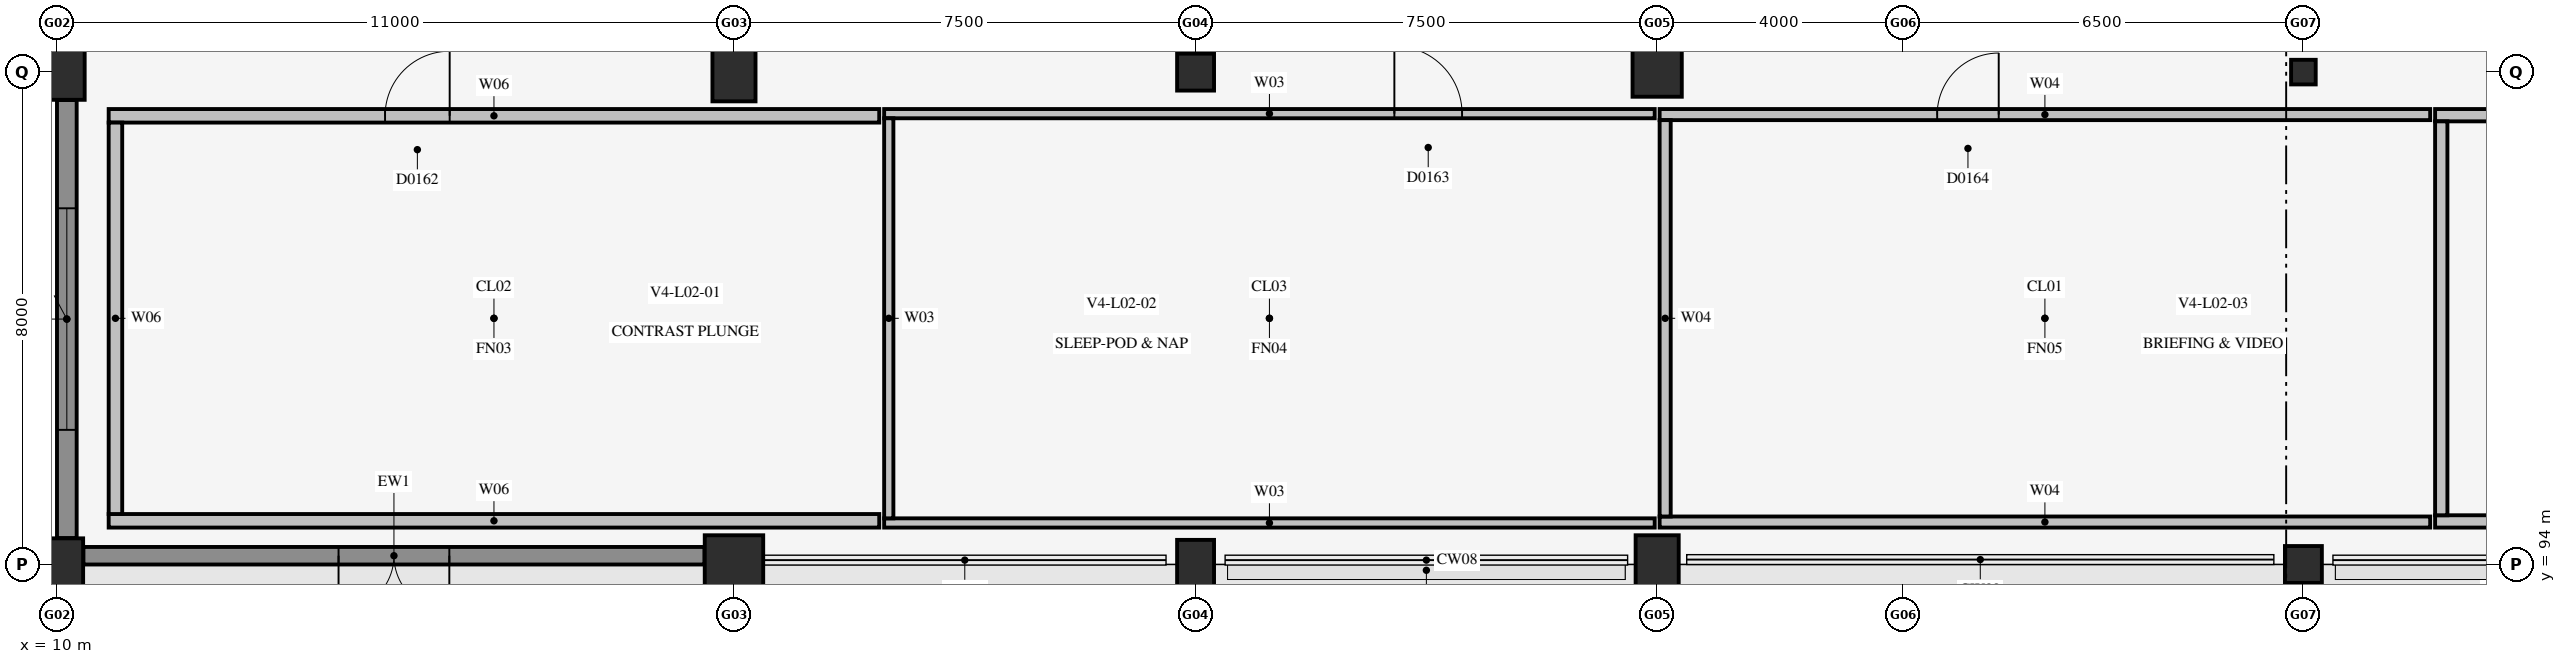
"""IFC4 building model, lengths in metres.
Left out: names, types, materials, properties, quantities, classifications, styles, units other than length and angle.
Written with IfcOpenShell. Run it as: python <this file> out.ifc"""

import sys

from ifc_helpers import new_model, si_unit, direction, frame, frame_2d, origin, origin_2d, place, context, subcontext, project, spatial, rectangle, circle, extrude, element, fill, save


model = new_model("IFC4")
c1 = context("Model", 3, precision=1e-05, world=origin(), true_north=direction((0.0, 1.0)))
c2 = subcontext(c1, "Body", "Model", "MODEL_VIEW")
j1 = project(units=[si_unit("LENGTHUNIT", "METRE"), si_unit("PLANEANGLEUNIT", "RADIAN")], contexts=[c1])
p1 = place(None, origin())
s1 = spatial("IfcSite", under=j1, at=p1, CompositionType="ELEMENT")
p2 = place(p1, origin())
s2 = spatial("IfcBuilding", under=s1, at=p2, CompositionType="ELEMENT")
p3 = place(p2, frame((0.0, 0.0, 10.2)))
s3 = spatial("IfcBuildingStorey", under=s2, at=p3, CompositionType="ELEMENT", Elevation=10.2)
p4 = place(p3, frame((10.0, 94.0, 0.0), z_axis=(0.0, 0.0, 1.0), x_axis=(1.0, 0.0, 0.0)))
e1 = element("IfcColumn", 1, at=p4, inside=s3, PredefinedType="COLUMN", context=c2, shape_type="SweptSolid", body=[
    extrude(rectangle(XDim=0.85, YDim=0.85, at=origin_2d()), origin(), (0.0, 0.0, 1.0), 4.25),
])
p5 = place(p3, frame((10.0, 102.0, 0.0), z_axis=(0.0, 0.0, 1.0), x_axis=(1.0, 0.0, 0.0)))
e2 = element("IfcColumn", 2, at=p5, inside=s3, PredefinedType="COLUMN", context=c2, shape_type="SweptSolid", body=[
    extrude(rectangle(XDim=0.9, YDim=0.9, at=origin_2d()), origin(), (0.0, 0.0, 1.0), 4.25),
])
p6 = place(p3, frame((21.0, 94.0, 0.0), z_axis=(0.0, 0.0, 1.0), x_axis=(1.0, 0.0, 0.0)))
e3 = element("IfcColumn", 3, at=p6, inside=s3, PredefinedType="COLUMN", context=c2, shape_type="SweptSolid", body=[
    extrude(rectangle(XDim=0.95, YDim=0.95, at=origin_2d()), origin(), (0.0, 0.0, 1.0), 4.25),
])
p7 = place(p3, frame((21.0, 102.0, 0.0), z_axis=(0.0, 0.0, 1.0), x_axis=(1.0, 0.0, 0.0)))
e4 = element("IfcColumn", 4, at=p7, inside=s3, PredefinedType="COLUMN", context=c2, shape_type="SweptSolid", body=[
    extrude(rectangle(XDim=0.7, YDim=0.95, at=origin_2d()), origin(), (0.0, 0.0, 1.0), 4.25),
])
p8 = place(p3, frame((28.5, 94.0, 0.0), z_axis=(0.0, 0.0, 1.0), x_axis=(1.0, 0.0, 0.0)))
e5 = element("IfcColumn", 5, at=p8, inside=s3, PredefinedType="COLUMN", context=c2, shape_type="SweptSolid", body=[
    extrude(rectangle(XDim=0.6, YDim=0.8, at=origin_2d()), origin(), (0.0, 0.0, 1.0), 4.25),
])
p9 = place(p3, frame((28.5, 102.0, 0.0), z_axis=(0.0, 0.0, 1.0), x_axis=(1.0, 0.0, 0.0)))
e6 = element("IfcColumn", 6, at=p9, inside=s3, PredefinedType="COLUMN", context=c2, shape_type="SweptSolid", body=[
    extrude(circle(Radius=0.3, at=origin_2d()), origin(), (0.0, 0.0, 1.0), 4.25),
])
p10 = place(p3, frame((36.0, 94.0, 0.0), z_axis=(0.0, 0.0, 1.0), x_axis=(1.0, 0.0, 0.0)))
e7 = element("IfcColumn", 7, at=p10, inside=s3, PredefinedType="COLUMN", context=c2, shape_type="SweptSolid", body=[
    extrude(rectangle(XDim=0.7, YDim=0.95, at=origin_2d()), origin(), (0.0, 0.0, 1.0), 4.25),
])
p11 = place(p3, frame((36.0, 102.0, 0.0), z_axis=(0.0, 0.0, 1.0), x_axis=(1.0, 0.0, 0.0)))
e8 = element("IfcColumn", 8, at=p11, inside=s3, PredefinedType="COLUMN", context=c2, shape_type="SweptSolid", body=[
    extrude(circle(Radius=0.4, at=origin_2d()), origin(), (0.0, 0.0, 1.0), 4.25),
])
p12 = place(p3, frame((46.5, 94.0, 0.0), z_axis=(0.0, 0.0, 1.0), x_axis=(1.0, 0.0, 0.0)))
e9 = element("IfcColumn", 9, at=p12, inside=s3, PredefinedType="COLUMN", context=c2, shape_type="SweptSolid", body=[
    extrude(circle(Radius=0.3, at=origin_2d()), origin(), (0.0, 0.0, 1.0), 4.25),
])
p13 = place(p3, frame((46.5, 102.0, 0.0), z_axis=(0.0, 0.0, 1.0), x_axis=(1.0, 0.0, 0.0)))
e10 = element("IfcColumn", 10, at=p13, inside=s3, PredefinedType="COLUMN", context=c2, shape_type="SweptSolid", body=[
    extrude(rectangle(XDim=0.4, YDim=0.4, at=origin_2d()), origin(), (0.0, 0.0, 1.0), 4.25),
])
p14 = place(p3, frame((10.84, 94.71, 0.0), z_axis=(0.0, 0.0, 1.0), x_axis=(1.0, 0.0, 0.0)))
e11 = element("IfcWall", 11, at=p14, inside=s3, PredefinedType="PLUMBINGWALL", context=c2, shape_type="SweptSolid", body=[
    extrude(rectangle(XDim=12.52, YDim=0.22, at=frame_2d((6.26, 0.0))), origin(), (0.0, 0.0, 1.0), 4.235),
])
p15 = place(p3, frame((10.84, 101.29, 0.0), z_axis=(0.0, 0.0, 1.0), x_axis=(1.0, 0.0, 0.0)))
e12 = element("IfcWall", 12, at=p15, inside=s3, PredefinedType="PLUMBINGWALL", context=c2, shape_type="SweptSolid", body=[
    extrude(rectangle(XDim=12.52, YDim=0.22, at=frame_2d((6.26, 0.0))), origin(), (0.0, 0.0, 1.0), 4.235),
])
p16 = place(p15, frame((4.49, 0.0, 0.0)))
e13 = element("IfcOpeningElement", 13, at=p16, cuts=e12, PredefinedType="OPENING", context=c2, shape_type="SweptSolid", body=[
    extrude(rectangle(XDim=1.05, YDim=2.15, at=frame_2d((0.525, 1.075))), frame((0.0, 0.122, 0.0), z_axis=(0.0, -1.0, 0.0), x_axis=(1.0, 0.0, 0.0)), (0.0, 0.0, 1.0), 0.244),
])
p17 = place(p3, frame((10.95, 94.82, 0.0), z_axis=(0.0, 0.0, 1.0), x_axis=(0.0, 1.0, 0.0)))
e14 = element("IfcWall", 14, at=p17, inside=s3, PredefinedType="PLUMBINGWALL", context=c2, shape_type="SweptSolid", body=[
    extrude(rectangle(XDim=6.36, YDim=0.22, at=frame_2d((3.18, 0.0))), origin(), (0.0, 0.0, 1.0), 4.235),
])
p18 = place(p3, frame((23.44, 94.675, 0.0), z_axis=(0.0, 0.0, 1.0), x_axis=(1.0, 0.0, 0.0)))
e15 = element("IfcWall", 15, at=p18, inside=s3, PredefinedType="PARTITIONING", context=c2, shape_type="SweptSolid", body=[
    extrude(rectangle(XDim=12.52, YDim=0.15, at=frame_2d((6.26, 0.0))), origin(), (0.0, 0.0, 1.0), 4.235),
])
p19 = place(p3, frame((23.44, 101.325, 0.0), z_axis=(0.0, 0.0, 1.0), x_axis=(1.0, 0.0, 0.0)))
e16 = element("IfcWall", 16, at=p19, inside=s3, PredefinedType="PARTITIONING", context=c2, shape_type="SweptSolid", body=[
    extrude(rectangle(XDim=12.52, YDim=0.15, at=frame_2d((6.26, 0.0))), origin(), (0.0, 0.0, 1.0), 4.235),
])
p20 = place(p19, frame((8.29, 0.0, 0.0)))
e17 = element("IfcOpeningElement", 17, at=p20, cuts=e16, PredefinedType="OPENING", context=c2, shape_type="SweptSolid", body=[
    extrude(rectangle(XDim=1.1, YDim=2.25, at=frame_2d((0.55, 1.125))), frame((0.0, 0.087, 0.0), z_axis=(0.0, -1.0, 0.0), x_axis=(1.0, 0.0, 0.0)), (0.0, 0.0, 1.0), 0.174),
])
p21 = place(p3, frame((23.515, 94.75, 0.0), z_axis=(0.0, 0.0, 1.0), x_axis=(0.0, 1.0, 0.0)))
e18 = element("IfcWall", 18, at=p21, inside=s3, PredefinedType="PARTITIONING", context=c2, shape_type="SweptSolid", body=[
    extrude(rectangle(XDim=6.5, YDim=0.15, at=frame_2d((3.25, 0.0))), origin(), (0.0, 0.0, 1.0), 3.869),
])
p22 = place(p3, frame((36.04, 94.69, 0.0), z_axis=(0.0, 0.0, 1.0), x_axis=(1.0, 0.0, 0.0)))
e19 = element("IfcWall", 19, at=p22, inside=s3, PredefinedType="PARTITIONING", context=c2, shape_type="SweptSolid", body=[
    extrude(rectangle(XDim=12.52, YDim=0.18, at=frame_2d((6.26, 0.0))), origin(), (0.0, 0.0, 1.0), 4.235),
])
p23 = place(p3, frame((36.04, 101.31, 0.0), z_axis=(0.0, 0.0, 1.0), x_axis=(1.0, 0.0, 0.0)))
e20 = element("IfcWall", 20, at=p23, inside=s3, PredefinedType="PARTITIONING", context=c2, shape_type="SweptSolid", body=[
    extrude(rectangle(XDim=12.52, YDim=0.18, at=frame_2d((6.26, 0.0))), origin(), (0.0, 0.0, 1.0), 4.235),
])
p24 = place(p23, frame((4.51, 0.0, 0.0)))
e21 = element("IfcOpeningElement", 21, at=p24, cuts=e20, PredefinedType="OPENING", context=c2, shape_type="SweptSolid", body=[
    extrude(rectangle(XDim=1.0, YDim=2.2, at=frame_2d((0.5, 1.1))), frame((0.0, 0.102, 0.0), z_axis=(0.0, -1.0, 0.0), x_axis=(1.0, 0.0, 0.0)), (0.0, 0.0, 1.0), 0.204),
])
p25 = place(p3, frame((36.13, 94.78, 0.0), z_axis=(0.0, 0.0, 1.0), x_axis=(0.0, 1.0, 0.0)))
e22 = element("IfcWall", 22, at=p25, inside=s3, PredefinedType="PARTITIONING", context=c2, shape_type="SweptSolid", body=[
    extrude(rectangle(XDim=6.44, YDim=0.18, at=frame_2d((3.22, 0.0))), origin(), (0.0, 0.0, 1.0), 3.603),
])
p26 = place(p3, frame((48.64, 94.7, 0.0), z_axis=(0.0, 0.0, 1.0), x_axis=(1.0, 0.0, 0.0)))
e23 = element("IfcWall", 23, at=p26, inside=s3, PredefinedType="PLUMBINGWALL", context=c2, shape_type="SweptSolid", body=[
    extrude(rectangle(XDim=12.52, YDim=0.2, at=frame_2d((6.26, 0.0))), origin(), (0.0, 0.0, 1.0), 4.235),
])
p27 = place(p3, frame((48.64, 101.3, 0.0), z_axis=(0.0, 0.0, 1.0), x_axis=(1.0, 0.0, 0.0)))
e24 = element("IfcWall", 24, at=p27, inside=s3, PredefinedType="PLUMBINGWALL", context=c2, shape_type="SweptSolid", body=[
    extrude(rectangle(XDim=12.52, YDim=0.2, at=frame_2d((6.26, 0.0))), origin(), (0.0, 0.0, 1.0), 4.235),
])
p28 = place(p27, frame((8.44, 0.0, 0.0)))
e25 = element("IfcOpeningElement", 25, at=p28, cuts=e24, PredefinedType="OPENING", context=c2, shape_type="SweptSolid", body=[
    extrude(rectangle(XDim=0.9, YDim=2.1, at=frame_2d((0.45, 1.05))), frame((0.0, 0.112, 0.0), z_axis=(0.0, -1.0, 0.0), x_axis=(1.0, 0.0, 0.0)), (0.0, 0.0, 1.0), 0.224),
])
p29 = place(p3, frame((48.74, 94.8, 0.0), z_axis=(0.0, 0.0, 1.0), x_axis=(0.0, 1.0, 0.0)))
e26 = element("IfcWall", 26, at=p29, inside=s3, PredefinedType="PLUMBINGWALL", context=c2, shape_type="SweptSolid", body=[
    extrude(rectangle(XDim=6.4, YDim=0.2, at=frame_2d((3.2, 0.0))), origin(), (0.0, 0.0, 1.0), 3.81),
])
p30 = place(p3, frame((10.429, 94.143, 0.0), z_axis=(0.0, 0.0, 1.0), x_axis=(1.0, 0.0, 0.0)))
e27 = element("IfcWall", 27, at=p30, inside=s3, PredefinedType="SOLIDWALL", context=c2, shape_type="SweptSolid", body=[
    extrude(rectangle(XDim=10.092, YDim=0.285, at=frame_2d((5.046, 0.0))), origin(), (0.0, 0.0, 1.0), 3.76),
])
p31 = place(p30, frame((4.146, 0.0, 0.0)))
e28 = element("IfcOpeningElement", 28, at=p31, cuts=e27, PredefinedType="OPENING", context=c2, shape_type="SweptSolid", body=[
    extrude(rectangle(XDim=1.8, YDim=2.4, at=frame_2d((0.9, 1.2))), frame((0.0, 0.154, 0.0), z_axis=(0.0, -1.0, 0.0), x_axis=(1.0, 0.0, 0.0)), (0.0, 0.0, 1.0), 0.309),
])
p32 = place(p3, frame((10.16, 94.429, 0.0), z_axis=(0.0, 0.0, 1.0), x_axis=(0.0, 1.0, 0.0)))
e29 = element("IfcWall", 29, at=p32, inside=s3, PredefinedType="SOLIDWALL", context=c2, shape_type="SweptSolid", body=[
    extrude(rectangle(XDim=7.117, YDim=0.32, at=frame_2d((3.559, 0.0))), origin(), (0.0, 0.0, 1.0), 3.684),
])
p33 = place(p32, frame((1.759, 0.0, 0.95)))
e30 = element("IfcOpeningElement", 30, at=p33, cuts=e29, PredefinedType="OPENING", context=c2, shape_type="SweptSolid", body=[
    extrude(rectangle(XDim=3.6, YDim=1.8, at=frame_2d((1.8, 0.9))), frame((0.0, 0.172, 0.0), z_axis=(0.0, -1.0, 0.0), x_axis=(1.0, 0.0, 0.0)), (0.0, 0.0, 1.0), 0.344),
])
p34 = place(p16, frame((1.05, 0.0, 0.0), z_axis=(0.0, 0.0, 1.0), x_axis=(-1.0, 0.0, 0.0)))
e31 = element("IfcDoor", 31, at=p34, inside=s3, OperationType="SINGLE_SWING_RIGHT", PredefinedType="DOOR", context=c2, shape_type="SweptSolid", body=[
    extrude(rectangle(XDim=1.05, YDim=2.15, at=frame_2d((0.525, 1.075))), frame((0.0, 0.025, 0.0), z_axis=(0.0, -1.0, 0.0), x_axis=(1.0, 0.0, 0.0)), (0.0, 0.0, 1.0), 0.05),
])
fill(e13, e31)
p35 = place(p20, frame((1.1, 0.0, 0.0), z_axis=(0.0, 0.0, 1.0), x_axis=(-1.0, 0.0, 0.0)))
e32 = element("IfcDoor", 32, at=p35, inside=s3, OperationType="SINGLE_SWING_LEFT", PredefinedType="DOOR", context=c2, shape_type="SweptSolid", body=[
    extrude(rectangle(XDim=1.1, YDim=2.25, at=frame_2d((0.55, 1.125))), frame((0.0, 0.025, 0.0), z_axis=(0.0, -1.0, 0.0), x_axis=(1.0, 0.0, 0.0)), (0.0, 0.0, 1.0), 0.05),
])
fill(e17, e32)
p36 = place(p24, frame((1.0, 0.0, 0.0), z_axis=(0.0, 0.0, 1.0), x_axis=(-1.0, 0.0, 0.0)))
e33 = element("IfcDoor", 33, at=p36, inside=s3, OperationType="SINGLE_SWING_RIGHT", PredefinedType="DOOR", context=c2, shape_type="SweptSolid", body=[
    extrude(rectangle(XDim=1.0, YDim=2.2, at=frame_2d((0.5, 1.1))), frame((0.0, 0.025, 0.0), z_axis=(0.0, -1.0, 0.0), x_axis=(1.0, 0.0, 0.0)), (0.0, 0.0, 1.0), 0.05),
])
fill(e21, e33)
p37 = place(p31, frame((1.8, 0.0, 0.0), z_axis=(0.0, 0.0, 1.0), x_axis=(-1.0, 0.0, 0.0)))
e34 = element("IfcDoor", 34, at=p37, inside=s3, OperationType="DOUBLE_DOOR_SINGLE_SWING", PredefinedType="DOOR", context=c2, shape_type="SweptSolid", body=[
    extrude(rectangle(XDim=1.8, YDim=2.4, at=frame_2d((0.9, 1.2))), frame((0.0, 0.025, 0.0), z_axis=(0.0, -1.0, 0.0), x_axis=(1.0, 0.0, 0.0)), (0.0, 0.0, 1.0), 0.05),
])
fill(e28, e34)
p38 = place(p33, origin())
e35 = element("IfcWindow", 35, at=p38, inside=s3, PartitioningType="SINGLE_PANEL", PredefinedType="WINDOW", context=c2, shape_type="SweptSolid", body=[
    extrude(rectangle(XDim=3.6, YDim=1.8, at=frame_2d((1.8, 0.9))), frame((0.0, 0.03, 0.0), z_axis=(0.0, -1.0, 0.0), x_axis=(1.0, 0.0, 0.0)), (0.0, 0.0, 1.0), 0.06),
])
fill(e30, e35)
save(model, sys.argv[1])
